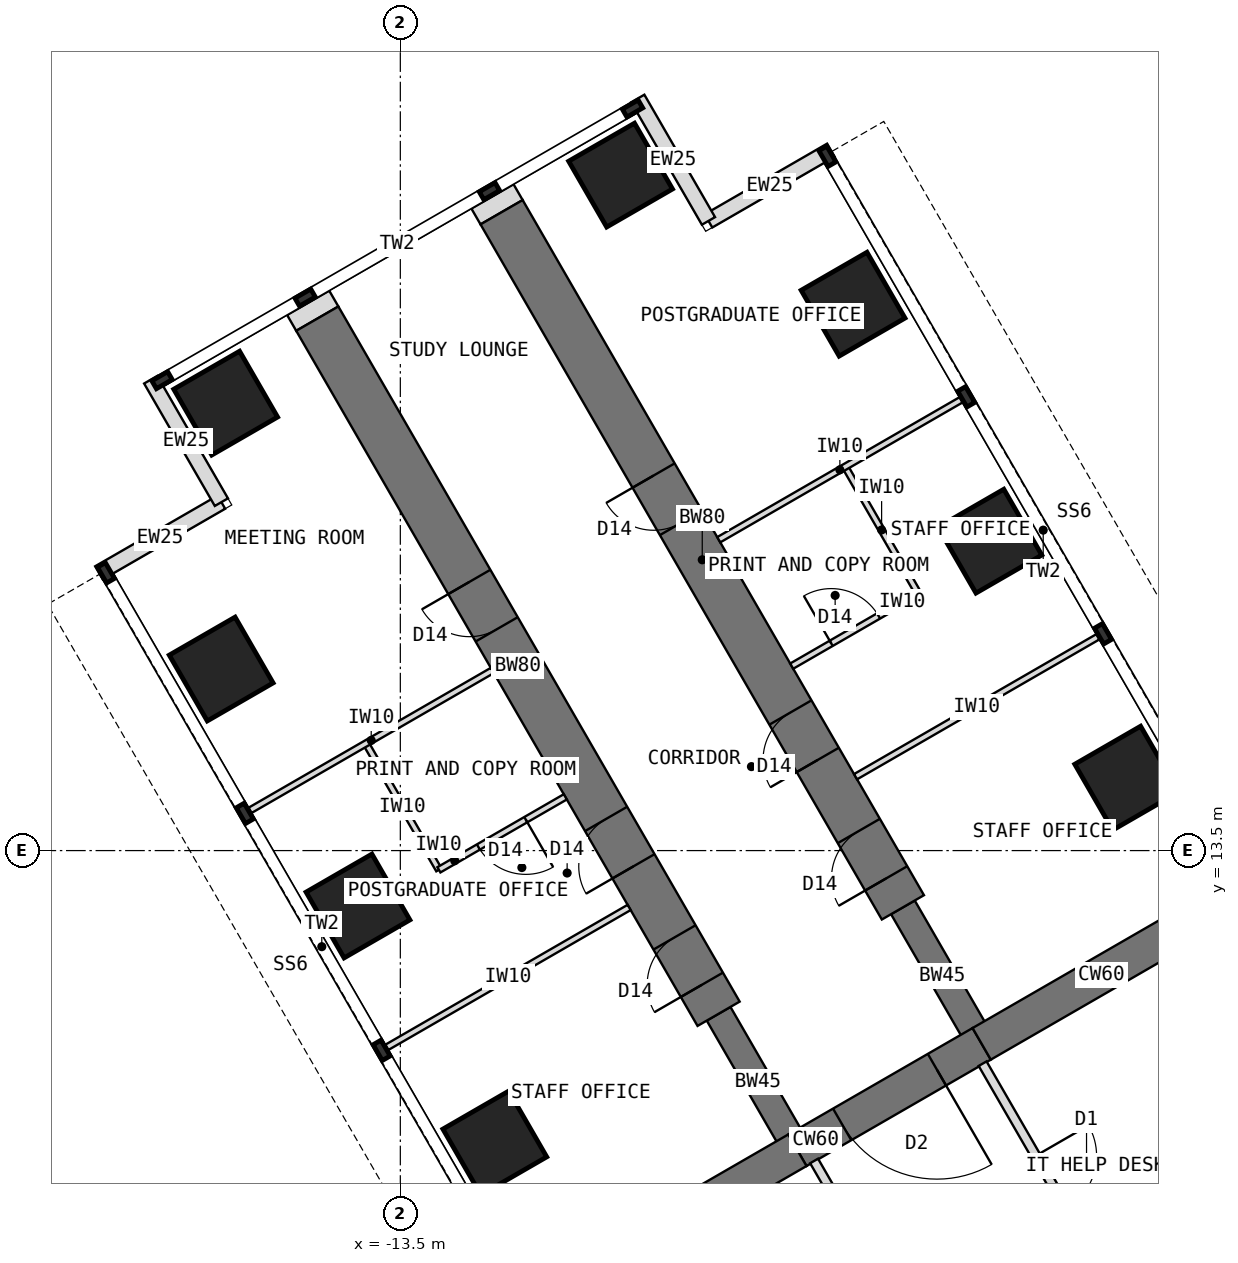
"""IFC4 building model, lengths in metres.
Left out: names, types, materials, properties, quantities, classifications, styles, units other than length and angle.
Written with IfcOpenShell. Run it as: python <this file> out.ifc"""

import sys

from ifc_helpers import new_model, si_unit, direction, frame, frame_2d, origin, origin_2d, place, context, subcontext, project, spatial, rectangle, extrude, element, fill, save


model = new_model("IFC4")
c1 = context("Model", 3, precision=1e-05, world=origin(), true_north=direction((0.0, 1.0)))
c2 = subcontext(c1, "Body", "Model", "MODEL_VIEW")
j1 = project(units=[si_unit("LENGTHUNIT", "METRE"), si_unit("PLANEANGLEUNIT", "RADIAN")], contexts=[c1])
p1 = place(None, origin())
s1 = spatial("IfcSite", under=j1, at=p1, CompositionType="ELEMENT")
p2 = place(p1, origin())
s2 = spatial("IfcBuilding", under=s1, at=p2, CompositionType="ELEMENT")
p3 = place(p2, frame((0.0, 0.0, 145.5)))
s3 = spatial("IfcBuildingStorey", under=s2, at=p3, CompositionType="ELEMENT", Elevation=145.5)
p4 = place(p3, frame((0.0, 12.596, 0.0), z_axis=(0.0, 0.0, 1.0), x_axis=(-0.866011268655, -0.500024481964, 0.0)))
e1 = element("IfcWall", 1, at=p4, inside=s3, PredefinedType="SHEAR", context=c2, shape_type="SweptSolid", body=[
    extrude(rectangle(XDim=4.548, YDim=0.6, at=frame_2d((2.274, 0.0))), origin(), (0.0, 0.0, 1.0), 4.0),
])
p5 = place(p3, frame((-3.939, 10.322, 0.0), z_axis=(0.0, 0.0, 1.0), x_axis=(-0.866019471182, -0.500010275428, 0.0)))
e2 = element("IfcWall", 2, at=p5, inside=s3, PredefinedType="SHEAR", context=c2, shape_type="SweptSolid", body=[
    extrude(rectangle(XDim=3.5, YDim=0.6, at=frame_2d((1.75, 0.0))), origin(), (0.0, 0.0, 1.0), 4.0),
])
p6 = place(p5, frame((0.85, 0.0, 0.0)))
e3 = element("IfcOpeningElement", 3, at=p6, cuts=e2, PredefinedType="OPENING", context=c2, shape_type="SweptSolid", body=[
    extrude(rectangle(XDim=1.8, YDim=2.1, at=frame_2d((0.9, 1.05))), frame((0.0, 0.31, 0.0), z_axis=(0.0, -1.0, 0.0), x_axis=(1.0, 0.0, 0.0)), (0.0, 0.0, 1.0), 0.62),
])
p7 = place(p3, frame((-6.97, 8.572, 0.0), z_axis=(0.0, 0.0, 1.0), x_axis=(-0.866034513004, -0.499984222037, 0.0)))
e4 = element("IfcWall", 4, at=p7, inside=s3, PredefinedType="SHEAR", context=c2, shape_type="SweptSolid", body=[
    extrude(rectangle(XDim=4.548, YDim=0.6, at=frame_2d((2.274, 0.0))), origin(), (0.0, 0.0, 1.0), 4.0),
])
p8 = place(p3, frame((-6.97, 8.572, 0.0), z_axis=(0.0, 0.0, 1.0), x_axis=(-0.499988811324, 0.866031863473, 0.0)))
e5 = element("IfcWall", 5, at=p8, inside=s3, PredefinedType="SHEAR", context=c2, shape_type="SweptSolid", body=[
    extrude(rectangle(XDim=2.592, YDim=0.45, at=frame_2d((1.296, 0.0))), origin(), (0.0, 0.0, 1.0), 4.0),
])
p9 = place(p3, frame((-8.266, 10.816, 0.0), z_axis=(0.0, 0.0, 1.0), x_axis=(-0.499996231654, 0.866027579429, 0.0)))
e6 = element("IfcWall", 6, at=p9, inside=s3, PredefinedType="SHEAR", context=c2, shape_type="SweptSolid", body=[
    extrude(rectangle(XDim=13.2, YDim=0.8, at=frame_2d((6.6, 0.0))), origin(), (0.0, 0.0, 1.0), 4.0),
])
p10 = place(p9, frame((0.55, 0.0, 0.0)))
e7 = element("IfcOpeningElement", 7, at=p10, cuts=e6, PredefinedType="OPENING", context=c2, shape_type="SweptSolid", body=[
    extrude(rectangle(XDim=0.9, YDim=2.1, at=frame_2d((0.45, 1.05))), frame((0.0, 0.41, 0.0), z_axis=(0.0, -1.0, 0.0), x_axis=(1.0, 0.0, 0.0)), (0.0, 0.0, 1.0), 0.82),
])
p11 = place(p9, frame((2.8, 0.0, 0.0)))
e8 = element("IfcOpeningElement", 8, at=p11, cuts=e6, PredefinedType="OPENING", context=c2, shape_type="SweptSolid", body=[
    extrude(rectangle(XDim=0.9, YDim=2.1, at=frame_2d((0.45, 1.05))), frame((0.0, 0.41, 0.0), z_axis=(0.0, -1.0, 0.0), x_axis=(1.0, 0.0, 0.0)), (0.0, 0.0, 1.0), 0.82),
])
p12 = place(p9, frame((7.3, 0.0, 0.0)))
e9 = element("IfcOpeningElement", 9, at=p12, cuts=e6, PredefinedType="OPENING", context=c2, shape_type="SweptSolid", body=[
    extrude(rectangle(XDim=0.9, YDim=2.1, at=frame_2d((0.45, 1.05))), frame((0.0, 0.41, 0.0), z_axis=(0.0, -1.0, 0.0), x_axis=(1.0, 0.0, 0.0)), (0.0, 0.0, 1.0), 0.82),
])
p13 = place(p3, frame((-3.939, 10.322, 0.0), z_axis=(0.0, 0.0, 1.0), x_axis=(-0.499918158782, 0.866072649678, 0.0)))
e10 = element("IfcWall", 10, at=p13, inside=s3, PredefinedType="SHEAR", context=c2, shape_type="SweptSolid", body=[
    extrude(rectangle(XDim=2.592, YDim=0.45, at=frame_2d((1.296, 0.0))), origin(), (0.0, 0.0, 1.0), 4.0),
])
p14 = place(p3, frame((-5.234, 12.566, 0.0), z_axis=(0.0, 0.0, 1.0), x_axis=(-0.500010103361, 0.866019570528, 0.0)))
e11 = element("IfcWall", 11, at=p14, inside=s3, PredefinedType="SHEAR", context=c2, shape_type="SweptSolid", body=[
    extrude(rectangle(XDim=13.2, YDim=0.8, at=frame_2d((6.6, 0.0))), origin(), (0.0, 0.0, 1.0), 4.0),
])
p15 = place(p14, frame((0.55, 0.0, 0.0)))
e12 = element("IfcOpeningElement", 12, at=p15, cuts=e11, PredefinedType="OPENING", context=c2, shape_type="SweptSolid", body=[
    extrude(rectangle(XDim=0.9, YDim=2.1, at=frame_2d((0.45, 1.05))), frame((0.0, 0.41, 0.0), z_axis=(0.0, -1.0, 0.0), x_axis=(1.0, 0.0, 0.0)), (0.0, 0.0, 1.0), 0.82),
])
p16 = place(p14, frame((2.8, 0.0, 0.0)))
e13 = element("IfcOpeningElement", 13, at=p16, cuts=e11, PredefinedType="OPENING", context=c2, shape_type="SweptSolid", body=[
    extrude(rectangle(XDim=0.9, YDim=2.1, at=frame_2d((0.45, 1.05))), frame((0.0, 0.41, 0.0), z_axis=(0.0, -1.0, 0.0), x_axis=(1.0, 0.0, 0.0)), (0.0, 0.0, 1.0), 0.82),
])
p17 = place(p14, frame((7.3, 0.0, 0.0)))
e14 = element("IfcOpeningElement", 14, at=p17, cuts=e11, PredefinedType="OPENING", context=c2, shape_type="SweptSolid", body=[
    extrude(rectangle(XDim=0.9, YDim=2.1, at=frame_2d((0.45, 1.05))), frame((0.0, 0.41, 0.0), z_axis=(0.0, -1.0, 0.0), x_axis=(1.0, 0.0, 0.0)), (0.0, 0.0, 1.0), 0.82),
])
for number, where, z_axis, x_axis in (
    (15, (-11.946, 8.691, 0.0), (0.0, 0.0, 1.0), (0.866, 0.5, 0.0)),
    (16, (-1.554, 14.691, 0.0), (0.0, 0.0, 1.0), (0.866, 0.5, 0.0)),
    (17, (-14.196, 12.588, 0.0), (0.0, 0.0, 1.0), (0.866, 0.5, 0.0)),
    (18, (-3.804, 18.588, 0.0), (0.0, 0.0, 1.0), (0.866, 0.5, 0.0)),
    (19, (-16.446, 16.486, 0.0), (0.0, 0.0, 1.0), (0.866, 0.5, 0.0)),
    (20, (-6.054, 22.486, 0.0), (0.0, 0.0, 1.0), (0.866, 0.5, 0.0)),
    (21, (-16.373, 20.858, 0.0), (0.0, 0.0, 1.0), (0.866, 0.5, 0.0)),
    (22, (-9.877, 24.608, 0.0), (0.0, 0.0, 1.0), (0.866, 0.5, 0.0)),
):
    element("IfcColumn", number, at=place(p3, frame(where, z_axis=z_axis, x_axis=x_axis)), inside=s3, PredefinedType="COLUMN", context=c2, shape_type="SweptSolid", body=[
        extrude(rectangle(XDim=1.25, YDim=1.25, at=origin_2d()), origin(), (0.0, 0.0, 1.0), 4.0),
    ])
for number, where, z_axis, x_axis in (
    (23, (-18.456, 18.067, 0.0), (0.0, 0.0, 1.0), (0.866, 0.5, 0.0)),
    (24, (-16.443, 19.23, 0.0), (0.0, 0.0, 1.0), (-0.5, 0.866, 0.0)),
    (25, (-6.419, 25.017, 0.0), (0.0, 0.0, 1.0), (-0.866, -0.5, 0.0)),
    (26, (-8.432, 23.855, 0.0), (0.0, 0.0, 1.0), (-0.5, 0.866, 0.0)),
):
    element("IfcWall", number, at=place(p3, frame(where, z_axis=z_axis, x_axis=x_axis)), inside=s3, PredefinedType="STANDARD", context=c2, shape_type="SweptSolid", body=[
        extrude(rectangle(XDim=2.325, YDim=0.25, at=frame_2d((1.163, 0.0))), origin(), (0.0, 0.0, 1.0), 3.8),
    ])
p18 = place(p3, frame((-14.865, 22.248, 0.0), z_axis=(0.0, 0.0, 1.0), x_axis=(-0.500426713919, 0.865778900179, 0.0)))
e27 = element("IfcWall", 27, at=p18, inside=s3, PredefinedType="PARTITIONING", context=c2, shape_type="SweptSolid", body=[
    extrude(rectangle(XDim=0.3, YDim=0.8, at=frame_2d((0.15, 0.0))), origin(), (0.0, 0.0, 1.0), 3.8),
])
p19 = place(p3, frame((-11.834, 23.998, 0.0), z_axis=(0.0, 0.0, 1.0), x_axis=(-0.499816412211, 0.866131372301, 0.0)))
e28 = element("IfcWall", 28, at=p19, inside=s3, PredefinedType="PARTITIONING", context=c2, shape_type="SweptSolid", body=[
    extrude(rectangle(XDim=0.3, YDim=0.8, at=frame_2d((0.15, 0.0))), origin(), (0.0, 0.0, 1.0), 3.8),
])
p20 = place(p3, frame((-1.201, 6.12, 0.0), z_axis=(0.0, 0.0, 1.0), x_axis=(0.49999668571, 0.866027317282, 0.0)))
e29 = element("IfcWall", 29, at=p20, inside=s3, PredefinedType="SHEAR", context=c2, shape_type="SweptSolid", body=[
    extrude(rectangle(XDim=5.908, YDim=0.4, at=frame_2d((2.954, 0.0))), origin(), (0.0, 0.0, 1.0), 4.0),
])
for number, where, z_axis, x_axis in (
    (30, (-9.737, 12.565, 0.0), (0.0, 0.0, 1.0), (-0.866, -0.5, 0.0)),
    (31, (-11.987, 16.462, 0.0), (0.0, 0.0, 1.0), (-0.866, -0.5, 0.0)),
):
    element("IfcWall", number, at=place(p3, frame(where, z_axis=z_axis, x_axis=x_axis)), inside=s3, PredefinedType="PARTITIONING", context=c2, shape_type="SweptSolid", body=[
        extrude(rectangle(XDim=4.6, YDim=0.1, at=frame_2d((2.3, 0.0))), origin(), (0.0, 0.0, 1.0), 3.8),
    ])
p21 = place(p3, frame((-12.865, 13.184, 0.0), z_axis=(0.0, 0.0, 1.0), x_axis=(-0.500001309137, 0.866024647952, 0.0)))
e32 = element("IfcWall", 32, at=p21, inside=s3, PredefinedType="PARTITIONING", context=c2, shape_type="SweptSolid", body=[
    extrude(rectangle(XDim=2.4, YDim=0.1, at=frame_2d((1.2, 0.0))), origin(), (0.0, 0.0, 1.0), 3.8),
])
p22 = place(p3, frame((-10.787, 14.384, 0.0), z_axis=(0.0, 0.0, 1.0), x_axis=(-0.866050077142, -0.499957262057, 0.0)))
e33 = element("IfcWall", 33, at=p22, inside=s3, PredefinedType="PARTITIONING", context=c2, shape_type="SweptSolid", body=[
    extrude(rectangle(XDim=2.4, YDim=0.1, at=frame_2d((1.2, 0.0))), origin(), (0.0, 0.0, 1.0), 3.8),
])
p23 = place(p22, frame((0.75, 0.0, 0.0)))
e34 = element("IfcOpeningElement", 34, at=p23, cuts=e33, PredefinedType="OPENING", context=c2, shape_type="SweptSolid", body=[
    extrude(rectangle(XDim=0.9, YDim=2.1, at=frame_2d((0.45, 1.05))), frame((0.0, 0.06, 0.0), z_axis=(0.0, -1.0, 0.0), x_axis=(1.0, 0.0, 0.0)), (0.0, 0.0, 1.0), 0.12),
])
for number, where, z_axis, x_axis in (
    (35, (-6.013, 14.715, 0.0), (0.0, 0.0, 1.0), (0.866, 0.5, 0.0)),
    (36, (-8.263, 18.612, 0.0), (0.0, 0.0, 1.0), (0.866, 0.5, 0.0)),
):
    element("IfcWall", number, at=place(p3, frame(where, z_axis=z_axis, x_axis=x_axis)), inside=s3, PredefinedType="PARTITIONING", context=c2, shape_type="SweptSolid", body=[
        extrude(rectangle(XDim=4.6, YDim=0.1, at=frame_2d((2.3, 0.0))), origin(), (0.0, 0.0, 1.0), 3.8),
    ])
p24 = place(p3, frame((-4.985, 17.734, 0.0), z_axis=(0.0, 0.0, 1.0), x_axis=(-0.500001309137, 0.866024647952, 0.0)))
e37 = element("IfcWall", 37, at=p24, inside=s3, PredefinedType="PARTITIONING", context=c2, shape_type="SweptSolid", body=[
    extrude(rectangle(XDim=2.4, YDim=0.1, at=frame_2d((1.2, 0.0))), origin(), (0.0, 0.0, 1.0), 3.8),
])
p25 = place(p3, frame((-7.063, 16.533, 0.0), z_axis=(0.0, 0.0, 1.0), x_axis=(0.865980596518, 0.500077600433, 0.0)))
e38 = element("IfcWall", 38, at=p25, inside=s3, PredefinedType="PARTITIONING", context=c2, shape_type="SweptSolid", body=[
    extrude(rectangle(XDim=2.4, YDim=0.1, at=frame_2d((1.2, 0.0))), origin(), (0.0, 0.0, 1.0), 3.8),
])
p26 = place(p25, frame((0.75, 0.0, 0.0)))
e39 = element("IfcOpeningElement", 39, at=p26, cuts=e38, PredefinedType="OPENING", context=c2, shape_type="SweptSolid", body=[
    extrude(rectangle(XDim=0.9, YDim=2.1, at=frame_2d((0.45, 1.05))), frame((0.0, 0.06, 0.0), z_axis=(0.0, -1.0, 0.0), x_axis=(1.0, 0.0, 0.0)), (0.0, 0.0, 1.0), 0.12),
])
p27 = place(p3, frame((-4.436, 4.483, 0.0), z_axis=(0.0, 0.0, 1.0), x_axis=(-0.500009315796, 0.86602002524, 0.0)))
e40 = element("IfcWall", 40, at=p27, inside=s3, PredefinedType="PARTITIONING", context=c2, shape_type="SweptSolid", body=[
    extrude(rectangle(XDim=4.519, YDim=0.15, at=frame_2d((2.259, 0.0))), origin(), (0.0, 0.0, 1.0), 3.8),
])
p28 = place(p27, frame((1.769, 0.0, 0.0)))
e41 = element("IfcOpeningElement", 41, at=p28, cuts=e40, PredefinedType="OPENING", context=c2, shape_type="SweptSolid", body=[
    extrude(rectangle(XDim=1.0, YDim=2.1, at=frame_2d((0.5, 1.05))), frame((0.0, 0.085, 0.0), z_axis=(0.0, -1.0, 0.0), x_axis=(1.0, 0.0, 0.0)), (0.0, 0.0, 1.0), 0.17),
])
p29 = place(p3, frame((-3.924, 9.996, 0.0), z_axis=(0.0, 0.0, 1.0), x_axis=(0.500032713409, -0.866006515865, 0.0)))
e42 = element("IfcWall", 42, at=p29, inside=s3, PredefinedType="PARTITIONING", context=c2, shape_type="SweptSolid", body=[
    extrude(rectangle(XDim=4.518, YDim=0.15, at=frame_2d((2.259, 0.0))), origin(), (0.0, 0.0, 1.0), 3.8),
])
p30 = place(p29, frame((1.749, 0.0, 0.0)))
e43 = element("IfcOpeningElement", 43, at=p30, cuts=e42, PredefinedType="OPENING", context=c2, shape_type="SweptSolid", body=[
    extrude(rectangle(XDim=1.0, YDim=2.1, at=frame_2d((0.5, 1.05))), frame((0.0, 0.085, 0.0), z_axis=(0.0, -1.0, 0.0), x_axis=(1.0, 0.0, 0.0)), (0.0, 0.0, 1.0), 0.17),
])
p31 = place(p6, origin())
e44 = element("IfcDoor", 44, at=p31, inside=s3, OperationType="DOUBLE_DOOR_DOUBLE_SWING", PredefinedType="DOOR", context=c2, shape_type="SweptSolid", body=[
    extrude(rectangle(XDim=1.72, YDim=2.06, at=frame_2d((0.9, 1.03))), frame((0.0, 0.025, 0.0), z_axis=(0.0, -1.0, 0.0), x_axis=(1.0, 0.0, 0.0)), (0.0, 0.0, 1.0), 0.05),
    extrude(rectangle(XDim=0.04, YDim=2.1, at=frame_2d((0.02, 1.05))), frame((0.0, 0.3, 0.0), z_axis=(0.0, -1.0, 0.0), x_axis=(1.0, 0.0, 0.0)), (0.0, 0.0, 1.0), 0.6),
    extrude(rectangle(XDim=0.04, YDim=2.1, at=frame_2d((1.78, 1.05))), frame((0.0, 0.3, 0.0), z_axis=(0.0, -1.0, 0.0), x_axis=(1.0, 0.0, 0.0)), (0.0, 0.0, 1.0), 0.6),
    extrude(rectangle(XDim=1.72, YDim=0.04, at=frame_2d((0.9, 2.08))), frame((0.0, 0.3, 0.0), z_axis=(0.0, -1.0, 0.0), x_axis=(1.0, 0.0, 0.0)), (0.0, 0.0, 1.0), 0.6),
])
fill(e3, e44)
p32 = place(p23, origin())
e45 = element("IfcDoor", 45, at=p32, inside=s3, OperationType="SINGLE_SWING_LEFT", PredefinedType="DOOR", context=c2, shape_type="SweptSolid", body=[
    extrude(rectangle(XDim=0.9, YDim=2.1, at=frame_2d((0.45, 1.05))), frame((0.0, 0.025, 0.0), z_axis=(0.0, -1.0, 0.0), x_axis=(1.0, 0.0, 0.0)), (0.0, 0.0, 1.0), 0.05),
])
fill(e34, e45)
p33 = place(p26, origin())
e46 = element("IfcDoor", 46, at=p33, inside=s3, OperationType="SINGLE_SWING_LEFT", PredefinedType="DOOR", context=c2, shape_type="SweptSolid", body=[
    extrude(rectangle(XDim=0.9, YDim=2.1, at=frame_2d((0.45, 1.05))), frame((0.0, 0.025, 0.0), z_axis=(0.0, -1.0, 0.0), x_axis=(1.0, 0.0, 0.0)), (0.0, 0.0, 1.0), 0.05),
])
fill(e39, e46)
p34 = place(p30, origin())
e47 = element("IfcDoor", 47, at=p34, inside=s3, OperationType="SINGLE_SWING_LEFT", PredefinedType="DOOR", context=c2, shape_type="SweptSolid", body=[
    extrude(rectangle(XDim=1.0, YDim=2.1, at=frame_2d((0.5, 1.05))), frame((0.0, 0.025, 0.0), z_axis=(0.0, -1.0, 0.0), x_axis=(1.0, 0.0, 0.0)), (0.0, 0.0, 1.0), 0.05),
])
fill(e43, e47)
p35 = place(p10, origin())
e48 = element("IfcDoor", 48, at=p35, inside=s3, OperationType="SINGLE_SWING_LEFT", PredefinedType="DOOR", context=c2, shape_type="SweptSolid", body=[
    extrude(rectangle(XDim=0.82, YDim=2.06, at=frame_2d((0.45, 1.03))), frame((0.0, 0.025, 0.0), z_axis=(0.0, -1.0, 0.0), x_axis=(1.0, 0.0, 0.0)), (0.0, 0.0, 1.0), 0.05),
    extrude(rectangle(XDim=0.04, YDim=2.1, at=frame_2d((0.02, 1.05))), frame((0.0, 0.4, 0.0), z_axis=(0.0, -1.0, 0.0), x_axis=(1.0, 0.0, 0.0)), (0.0, 0.0, 1.0), 0.8),
    extrude(rectangle(XDim=0.04, YDim=2.1, at=frame_2d((0.88, 1.05))), frame((0.0, 0.4, 0.0), z_axis=(0.0, -1.0, 0.0), x_axis=(1.0, 0.0, 0.0)), (0.0, 0.0, 1.0), 0.8),
    extrude(rectangle(XDim=0.82, YDim=0.04, at=frame_2d((0.45, 2.08))), frame((0.0, 0.4, 0.0), z_axis=(0.0, -1.0, 0.0), x_axis=(1.0, 0.0, 0.0)), (0.0, 0.0, 1.0), 0.8),
])
fill(e7, e48)
p36 = place(p11, origin())
e49 = element("IfcDoor", 49, at=p36, inside=s3, OperationType="SINGLE_SWING_LEFT", PredefinedType="DOOR", context=c2, shape_type="SweptSolid", body=[
    extrude(rectangle(XDim=0.82, YDim=2.06, at=frame_2d((0.45, 1.03))), frame((0.0, 0.025, 0.0), z_axis=(0.0, -1.0, 0.0), x_axis=(1.0, 0.0, 0.0)), (0.0, 0.0, 1.0), 0.05),
    extrude(rectangle(XDim=0.04, YDim=2.1, at=frame_2d((0.02, 1.05))), frame((0.0, 0.4, 0.0), z_axis=(0.0, -1.0, 0.0), x_axis=(1.0, 0.0, 0.0)), (0.0, 0.0, 1.0), 0.8),
    extrude(rectangle(XDim=0.04, YDim=2.1, at=frame_2d((0.88, 1.05))), frame((0.0, 0.4, 0.0), z_axis=(0.0, -1.0, 0.0), x_axis=(1.0, 0.0, 0.0)), (0.0, 0.0, 1.0), 0.8),
    extrude(rectangle(XDim=0.82, YDim=0.04, at=frame_2d((0.45, 2.08))), frame((0.0, 0.4, 0.0), z_axis=(0.0, -1.0, 0.0), x_axis=(1.0, 0.0, 0.0)), (0.0, 0.0, 1.0), 0.8),
])
fill(e8, e49)
p37 = place(p12, origin())
e50 = element("IfcDoor", 50, at=p37, inside=s3, OperationType="SINGLE_SWING_RIGHT", PredefinedType="DOOR", context=c2, shape_type="SweptSolid", body=[
    extrude(rectangle(XDim=0.82, YDim=2.06, at=frame_2d((0.45, 1.03))), frame((0.0, 0.025, 0.0), z_axis=(0.0, -1.0, 0.0), x_axis=(1.0, 0.0, 0.0)), (0.0, 0.0, 1.0), 0.05),
    extrude(rectangle(XDim=0.04, YDim=2.1, at=frame_2d((0.02, 1.05))), frame((0.0, 0.4, 0.0), z_axis=(0.0, -1.0, 0.0), x_axis=(1.0, 0.0, 0.0)), (0.0, 0.0, 1.0), 0.8),
    extrude(rectangle(XDim=0.04, YDim=2.1, at=frame_2d((0.88, 1.05))), frame((0.0, 0.4, 0.0), z_axis=(0.0, -1.0, 0.0), x_axis=(1.0, 0.0, 0.0)), (0.0, 0.0, 1.0), 0.8),
    extrude(rectangle(XDim=0.82, YDim=0.04, at=frame_2d((0.45, 2.08))), frame((0.0, 0.4, 0.0), z_axis=(0.0, -1.0, 0.0), x_axis=(1.0, 0.0, 0.0)), (0.0, 0.0, 1.0), 0.8),
])
fill(e9, e50)
p38 = place(p15, origin())
e51 = element("IfcDoor", 51, at=p38, inside=s3, OperationType="SINGLE_SWING_LEFT", PredefinedType="DOOR", context=c2, shape_type="SweptSolid", body=[
    extrude(rectangle(XDim=0.82, YDim=2.06, at=frame_2d((0.45, 1.03))), frame((0.0, 0.025, 0.0), z_axis=(0.0, -1.0, 0.0), x_axis=(1.0, 0.0, 0.0)), (0.0, 0.0, 1.0), 0.05),
    extrude(rectangle(XDim=0.04, YDim=2.1, at=frame_2d((0.02, 1.05))), frame((0.0, 0.4, 0.0), z_axis=(0.0, -1.0, 0.0), x_axis=(1.0, 0.0, 0.0)), (0.0, 0.0, 1.0), 0.8),
    extrude(rectangle(XDim=0.04, YDim=2.1, at=frame_2d((0.88, 1.05))), frame((0.0, 0.4, 0.0), z_axis=(0.0, -1.0, 0.0), x_axis=(1.0, 0.0, 0.0)), (0.0, 0.0, 1.0), 0.8),
    extrude(rectangle(XDim=0.82, YDim=0.04, at=frame_2d((0.45, 2.08))), frame((0.0, 0.4, 0.0), z_axis=(0.0, -1.0, 0.0), x_axis=(1.0, 0.0, 0.0)), (0.0, 0.0, 1.0), 0.8),
])
fill(e12, e51)
p39 = place(p16, origin())
e52 = element("IfcDoor", 52, at=p39, inside=s3, OperationType="SINGLE_SWING_LEFT", PredefinedType="DOOR", context=c2, shape_type="SweptSolid", body=[
    extrude(rectangle(XDim=0.82, YDim=2.06, at=frame_2d((0.45, 1.03))), frame((0.0, 0.025, 0.0), z_axis=(0.0, -1.0, 0.0), x_axis=(1.0, 0.0, 0.0)), (0.0, 0.0, 1.0), 0.05),
    extrude(rectangle(XDim=0.04, YDim=2.1, at=frame_2d((0.02, 1.05))), frame((0.0, 0.4, 0.0), z_axis=(0.0, -1.0, 0.0), x_axis=(1.0, 0.0, 0.0)), (0.0, 0.0, 1.0), 0.8),
    extrude(rectangle(XDim=0.04, YDim=2.1, at=frame_2d((0.88, 1.05))), frame((0.0, 0.4, 0.0), z_axis=(0.0, -1.0, 0.0), x_axis=(1.0, 0.0, 0.0)), (0.0, 0.0, 1.0), 0.8),
    extrude(rectangle(XDim=0.82, YDim=0.04, at=frame_2d((0.45, 2.08))), frame((0.0, 0.4, 0.0), z_axis=(0.0, -1.0, 0.0), x_axis=(1.0, 0.0, 0.0)), (0.0, 0.0, 1.0), 0.8),
])
fill(e13, e52)
p40 = place(p17, origin())
e53 = element("IfcDoor", 53, at=p40, inside=s3, OperationType="SINGLE_SWING_RIGHT", PredefinedType="DOOR", context=c2, shape_type="SweptSolid", body=[
    extrude(rectangle(XDim=0.82, YDim=2.06, at=frame_2d((0.45, 1.03))), frame((0.0, 0.025, 0.0), z_axis=(0.0, -1.0, 0.0), x_axis=(1.0, 0.0, 0.0)), (0.0, 0.0, 1.0), 0.05),
    extrude(rectangle(XDim=0.04, YDim=2.1, at=frame_2d((0.02, 1.05))), frame((0.0, 0.4, 0.0), z_axis=(0.0, -1.0, 0.0), x_axis=(1.0, 0.0, 0.0)), (0.0, 0.0, 1.0), 0.8),
    extrude(rectangle(XDim=0.04, YDim=2.1, at=frame_2d((0.88, 1.05))), frame((0.0, 0.4, 0.0), z_axis=(0.0, -1.0, 0.0), x_axis=(1.0, 0.0, 0.0)), (0.0, 0.0, 1.0), 0.8),
    extrude(rectangle(XDim=0.82, YDim=0.04, at=frame_2d((0.45, 2.08))), frame((0.0, 0.4, 0.0), z_axis=(0.0, -1.0, 0.0), x_axis=(1.0, 0.0, 0.0)), (0.0, 0.0, 1.0), 0.8),
])
fill(e14, e53)
save(model, sys.argv[1])
